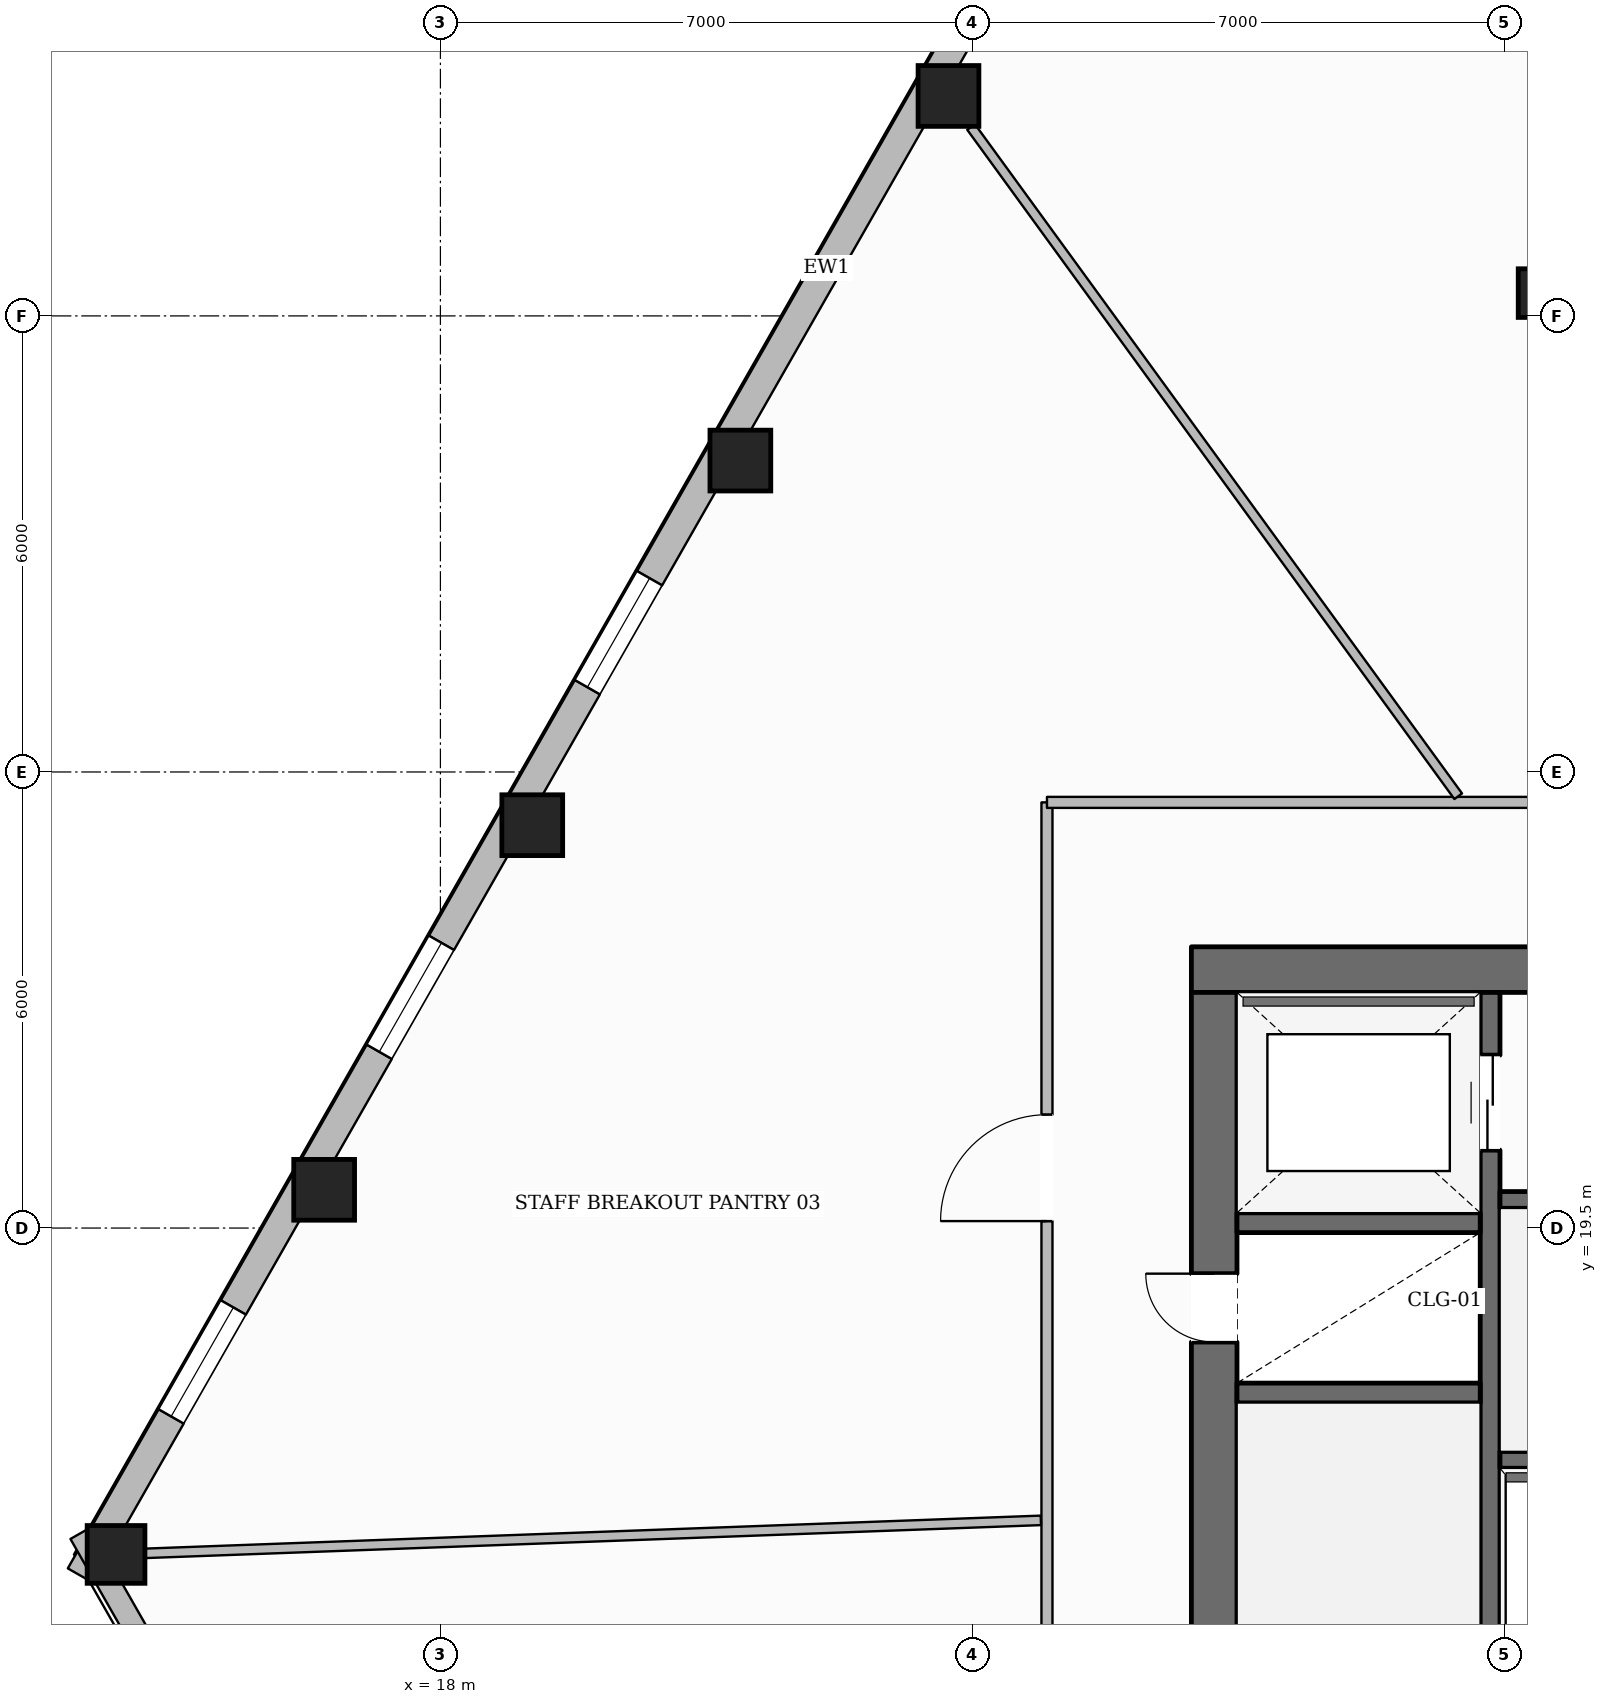
"""IFC4 building model, lengths in metres.
Left out: names, types, materials, properties, quantities, classifications, styles, units other than length and angle.
Written with IfcOpenShell. Run it as: python <this file> out.ifc"""

import sys

from ifc_helpers import new_model, si_unit, direction, frame, frame_2d, origin, origin_2d, place, context, subcontext, project, spatial, rectangle, hollow_rectangle, extrude, element, fill, save


model = new_model("IFC4")
c1 = context("Model", 3, precision=1e-05, world=origin(), true_north=direction((0.0, 1.0)))
c2 = subcontext(c1, "Body", "Model", "MODEL_VIEW")
j1 = project(units=[si_unit("LENGTHUNIT", "METRE"), si_unit("PLANEANGLEUNIT", "RADIAN")], contexts=[c1])
p1 = place(None, origin())
s1 = spatial("IfcSite", under=j1, at=p1, CompositionType="ELEMENT")
p2 = place(p1, origin())
s2 = spatial("IfcBuilding", under=s1, at=p2, CompositionType="ELEMENT")
p3 = place(p2, frame((0.0, 0.0, 29.1)))
s3 = spatial("IfcBuildingStorey", under=s2, at=p3, CompositionType="ELEMENT", Elevation=29.1)
p4 = place(p3, frame((27.88, 22.9, 0.0), z_axis=(0.0, 0.0, 1.0), x_axis=(1.0, 0.0, 0.0)))
e1 = element("IfcWall", 1, at=p4, inside=s3, PredefinedType="SOLIDWALL", context=c2, shape_type="SweptSolid", body=[
    extrude(rectangle(XDim=20.24, YDim=0.6, at=frame_2d((10.12, 0.0))), origin(), (0.0, 0.0, 1.0), 3.59),
])
p5 = place(p4, frame((6.395, 0.0, 0.0)))
e2 = element("IfcOpeningElement", 2, at=p5, cuts=e1, PredefinedType="OPENING", context=c2, shape_type="SweptSolid", body=[
    extrude(rectangle(XDim=1.05, YDim=2.15, at=frame_2d((0.525, 1.075))), frame((0.0, 0.31, 0.0), z_axis=(0.0, -1.0, 0.0), x_axis=(1.0, 0.0, 0.0)), (0.0, 0.0, 1.0), 0.62),
])
p6 = place(p4, frame((12.795, 0.0, 0.0)))
e3 = element("IfcOpeningElement", 3, at=p6, cuts=e1, PredefinedType="OPENING", context=c2, shape_type="SweptSolid", body=[
    extrude(rectangle(XDim=1.05, YDim=2.15, at=frame_2d((0.525, 1.075))), frame((0.0, 0.31, 0.0), z_axis=(0.0, -1.0, 0.0), x_axis=(1.0, 0.0, 0.0)), (0.0, 0.0, 1.0), 0.62),
])
p7 = place(p3, frame((28.18, 9.6, 0.0), z_axis=(0.0, 0.0, 1.0), x_axis=(0.0, 1.0, 0.0)))
e4 = element("IfcWall", 4, at=p7, inside=s3, PredefinedType="SOLIDWALL", context=c2, shape_type="SweptSolid", body=[
    extrude(rectangle(XDim=13.0, YDim=0.6, at=frame_2d((6.5, 0.0))), origin(), (0.0, 0.0, 1.0), 3.59),
])
p8 = place(p7, frame((0.2, 0.0, 0.0)))
e5 = element("IfcOpeningElement", 5, at=p8, cuts=e4, PredefinedType="OPENING", context=c2, shape_type="SweptSolid", body=[
    extrude(rectangle(XDim=1.1, YDim=2.15, at=frame_2d((0.55, 1.075))), frame((0.0, 0.31, 0.0), z_axis=(0.0, -1.0, 0.0), x_axis=(1.0, 0.0, 0.0)), (0.0, 0.0, 1.0), 0.62),
])
p9 = place(p7, frame((8.4, 0.0, 0.0)))
e6 = element("IfcOpeningElement", 6, at=p9, cuts=e4, PredefinedType="OPENING", context=c2, shape_type="SweptSolid", body=[
    extrude(rectangle(XDim=0.9, YDim=2.1, at=frame_2d((0.45, 1.05))), frame((0.0, 0.31, 0.0), z_axis=(0.0, -1.0, 0.0), x_axis=(1.0, 0.0, 0.0)), (0.0, 0.0, 1.0), 0.62),
])
p10 = place(p3, frame((31.81, 9.6, 0.0), z_axis=(0.0, 0.0, 1.0), x_axis=(0.0, 1.0, 0.0)))
e7 = element("IfcWall", 7, at=p10, inside=s3, PredefinedType="SHEAR", context=c2, shape_type="SweptSolid", body=[
    extrude(rectangle(XDim=13.0, YDim=0.26, at=frame_2d((6.5, 0.0))), origin(), (0.0, 0.0, 1.0), 3.59),
])
p11 = place(p10, frame((10.925, 0.0, 0.0)))
e8 = element("IfcOpeningElement", 8, at=p11, cuts=e7, PredefinedType="OPENING", context=c2, shape_type="SweptSolid", body=[
    extrude(rectangle(XDim=1.25, YDim=2.25, at=frame_2d((0.625, 1.125))), frame((0.0, 0.14, 0.0), z_axis=(0.0, -1.0, 0.0), x_axis=(1.0, 0.0, 0.0)), (0.0, 0.0, 1.0), 0.28),
])
for number, where, z_axis, x_axis in (
    (9, (28.48, 17.33, 0.0), (0.0, 0.0, 1.0), (1.0, 0.0, 0.0)),
    (10, (28.48, 19.57, 0.0), (0.0, 0.0, 1.0), (1.0, 0.0, 0.0)),
):
    element("IfcWall", number, at=place(p3, frame(where, z_axis=z_axis, x_axis=x_axis)), inside=s3, PredefinedType="SHEAR", context=c2, shape_type="SweptSolid", body=[
        extrude(rectangle(XDim=3.2, YDim=0.26, at=frame_2d((1.6, 0.0))), origin(), (0.0, 0.0, 1.0), 3.59),
    ])
p12 = place(p3, frame((31.94, 19.87, 0.0), z_axis=(0.0, 0.0, 1.0), x_axis=(1.0, 0.0, 0.0)))
e11 = element("IfcWall", 11, at=p12, inside=s3, PredefinedType="SOLIDWALL", context=c2, shape_type="SweptSolid", body=[
    extrude(rectangle(XDim=12.12, YDim=0.22, at=frame_2d((6.06, 0.0))), origin(), (0.0, 0.0, 1.0), 3.59),
])
p13 = place(p12, frame((6.3, 0.0, 0.0)))
e12 = element("IfcOpeningElement", 12, at=p13, cuts=e11, PredefinedType="OPENING", context=c2, shape_type="SweptSolid", body=[
    extrude(rectangle(XDim=1.1, YDim=2.15, at=frame_2d((0.55, 1.075))), frame((0.0, 0.12, 0.0), z_axis=(0.0, -1.0, 0.0), x_axis=(1.0, 0.0, 0.0)), (0.0, 0.0, 1.0), 0.24),
])
p14 = place(p12, frame((9.51, 0.0, 0.0)))
e13 = element("IfcOpeningElement", 13, at=p14, cuts=e11, PredefinedType="OPENING", context=c2, shape_type="SweptSolid", body=[
    extrude(rectangle(XDim=0.9, YDim=2.1, at=frame_2d((0.45, 1.05))), frame((0.0, 0.12, 0.0), z_axis=(0.0, -1.0, 0.0), x_axis=(1.0, 0.0, 0.0)), (0.0, 0.0, 1.0), 0.24),
])
p15 = place(p3, frame((31.94, 16.45, 0.0), z_axis=(0.0, 0.0, 1.0), x_axis=(1.0, 0.0, 0.0)))
e14 = element("IfcWall", 14, at=p15, inside=s3, PredefinedType="SOLIDWALL", context=c2, shape_type="SweptSolid", body=[
    extrude(rectangle(XDim=12.12, YDim=0.22, at=frame_2d((6.06, 0.0))), origin(), (0.0, 0.0, 1.0), 3.59),
])
for number, where, z_axis, x_axis in (
    (15, (24.684, 34.394, 0.0), (0.0, 0.0, 1.0), (1.0, 0.0, 0.0)),
    (16, (21.946, 29.597, 0.0), (0.0, 0.0, 1.0), (1.0, 0.0, 0.0)),
    (17, (19.208, 24.8, 0.0), (0.0, 0.0, 1.0), (1.0, 0.0, 0.0)),
    (18, (16.47, 20.003, 0.0), (0.0, 0.0, 1.0), (1.0, 0.0, 0.0)),
):
    element("IfcColumn", number, at=place(p3, frame(where, z_axis=z_axis, x_axis=x_axis)), inside=s3, PredefinedType="COLUMN", context=c2, shape_type="SweptSolid", body=[
        extrude(hollow_rectangle(XDim=0.8, YDim=0.8, WallThickness=0.036, at=origin_2d()), origin(), (0.0, 0.0, 1.0), 3.59),
    ])
p16 = place(p3, frame((13.733, 15.206, 0.0), z_axis=(0.0, 0.0, 1.0), x_axis=(1.0, 0.0, 0.0)))
e19 = element("IfcColumn", 19, at=p16, inside=s3, PredefinedType="COLUMN", context=c2, shape_type="SweptSolid", body=[
    extrude(hollow_rectangle(XDim=0.76, YDim=0.76, WallThickness=0.035, at=origin_2d()), origin(), (0.0, 0.0, 1.0), 3.59),
])
p17 = place(p3, frame((32.5, 31.8, 0.0), z_axis=(0.0, 0.0, 1.0), x_axis=(1.0, 0.0, 0.0)))
e20 = element("IfcColumn", 20, at=p17, inside=s3, PredefinedType="COLUMN", context=c2, shape_type="SweptSolid", body=[
    extrude(hollow_rectangle(XDim=0.64, YDim=0.64, WallThickness=0.028, at=origin_2d()), origin(), (0.0, 0.0, 1.0), 3.59),
])
p18 = place(p3, frame((13.263, 14.928, 0.0), z_axis=(0.0, 0.0, 1.0), x_axis=(0.495711630902, 0.868487178367, 0.0)))
e21 = element("IfcWall", 21, at=p18, inside=s3, PredefinedType="STANDARD", context=c2, shape_type="SweptSolid", body=[
    extrude(rectangle(XDim=34.092, YDim=0.38, at=frame_2d((17.046, 0.0))), origin(), (0.0, 0.0, 1.0), 2.97),
])
p19 = place(p18, frame((30.027, 0.0, 0.65)))
e22 = element("IfcOpeningElement", 22, at=p19, cuts=e21, PredefinedType="OPENING", context=c2, shape_type="SweptSolid", body=[
    extrude(rectangle(XDim=1.65, YDim=1.75, at=frame_2d((0.825, 0.875))), frame((0.0, 0.2, 0.0), z_axis=(0.0, -1.0, 0.0), x_axis=(1.0, 0.0, 0.0)), (0.0, 0.0, 1.0), 0.4),
])
p20 = place(p18, frame((24.504, 0.0, 0.65)))
e23 = element("IfcOpeningElement", 23, at=p20, cuts=e21, PredefinedType="OPENING", context=c2, shape_type="SweptSolid", body=[
    extrude(rectangle(XDim=1.65, YDim=1.75, at=frame_2d((0.825, 0.875))), frame((0.0, 0.2, 0.0), z_axis=(0.0, -1.0, 0.0), x_axis=(1.0, 0.0, 0.0)), (0.0, 0.0, 1.0), 0.4),
])
p21 = place(p18, frame((13.457, 0.0, 0.65)))
e24 = element("IfcOpeningElement", 24, at=p21, cuts=e21, PredefinedType="OPENING", context=c2, shape_type="SweptSolid", body=[
    extrude(rectangle(XDim=1.65, YDim=1.75, at=frame_2d((0.825, 0.875))), frame((0.0, 0.2, 0.0), z_axis=(0.0, -1.0, 0.0), x_axis=(1.0, 0.0, 0.0)), (0.0, 0.0, 1.0), 0.4),
])
p22 = place(p18, frame((7.934, 0.0, 0.65)))
e25 = element("IfcOpeningElement", 25, at=p22, cuts=e21, PredefinedType="OPENING", context=c2, shape_type="SweptSolid", body=[
    extrude(rectangle(XDim=1.65, YDim=1.75, at=frame_2d((0.825, 0.875))), frame((0.0, 0.2, 0.0), z_axis=(0.0, -1.0, 0.0), x_axis=(1.0, 0.0, 0.0)), (0.0, 0.0, 1.0), 0.4),
])
p23 = place(p18, frame((2.411, 0.0, 0.65)))
e26 = element("IfcOpeningElement", 26, at=p23, cuts=e21, PredefinedType="OPENING", context=c2, shape_type="SweptSolid", body=[
    extrude(rectangle(XDim=1.65, YDim=1.75, at=frame_2d((0.825, 0.875))), frame((0.0, 0.2, 0.0), z_axis=(0.0, -1.0, 0.0), x_axis=(1.0, 0.0, 0.0)), (0.0, 0.0, 1.0), 0.4),
])
p24 = place(p3, frame((21.58, 0.913, 0.0), z_axis=(0.0, 0.0, 1.0), x_axis=(-0.495706340457, 0.868490198005, 0.0)))
e27 = element("IfcWall", 27, at=p24, inside=s3, PredefinedType="STANDARD", context=c2, shape_type="SweptSolid", body=[
    extrude(rectangle(XDim=16.777, YDim=0.3, at=frame_2d((8.388, 0.0))), origin(), (0.0, 0.0, 1.0), 2.97),
])
p25 = place(p24, frame((7.789, 0.0, 0.65)))
e28 = element("IfcOpeningElement", 28, at=p25, cuts=e27, PredefinedType="OPENING", context=c2, shape_type="SweptSolid", body=[
    extrude(rectangle(XDim=1.2, YDim=1.7, at=frame_2d((0.6, 0.85))), frame((0.0, 0.16, 0.0), z_axis=(0.0, -1.0, 0.0), x_axis=(1.0, 0.0, 0.0)), (0.0, 0.0, 1.0), 0.32),
])
p26 = place(p3, frame((25.98, 9.1, 0.0), z_axis=(0.0, 0.0, 1.0), x_axis=(0.0, 1.0, 0.0)))
e29 = element("IfcWall", 29, at=p26, inside=s3, PredefinedType="PARTITIONING", context=c2, shape_type="SweptSolid", body=[
    extrude(rectangle(XDim=16.0, YDim=0.145, at=frame_2d((8.0, 0.0))), origin(), (0.0, 0.0, 1.0), 3.278),
])
p27 = place(p26, frame((10.491, 0.0, 0.0)))
e30 = element("IfcOpeningElement", 30, at=p27, cuts=e29, PredefinedType="OPENING", context=c2, shape_type="SweptSolid", body=[
    extrude(rectangle(XDim=1.4, YDim=2.2, at=frame_2d((0.7, 1.1))), frame((0.0, 0.083, 0.0), z_axis=(0.0, -1.0, 0.0), x_axis=(1.0, 0.0, 0.0)), (0.0, 0.0, 1.0), 0.165),
])
p28 = place(p26, frame((2.663, 0.0, 0.0)))
e31 = element("IfcOpeningElement", 31, at=p28, cuts=e29, PredefinedType="OPENING", context=c2, shape_type="SweptSolid", body=[
    extrude(rectangle(XDim=1.4, YDim=2.2, at=frame_2d((0.7, 1.1))), frame((0.0, 0.083, 0.0), z_axis=(0.0, -1.0, 0.0), x_axis=(1.0, 0.0, 0.0)), (0.0, 0.0, 1.0), 0.165),
])
p29 = place(p3, frame((25.98, 25.1, 0.0), z_axis=(0.0, 0.0, 1.0), x_axis=(1.0, 0.0, 0.0)))
e32 = element("IfcWall", 32, at=p29, inside=s3, PredefinedType="PARTITIONING", context=c2, shape_type="SweptSolid", body=[
    extrude(rectangle(XDim=11.02, YDim=0.145, at=frame_2d((5.51, 0.0))), origin(), (0.0, 0.0, 1.0), 3.59),
])
p30 = place(p3, frame((31.39, 25.18, 0.0), z_axis=(0.0, 0.0, 1.0), x_axis=(-0.588482227792, 0.808510153043, 0.0)))
e33 = element("IfcWall", 33, at=p30, inside=s3, PredefinedType="PARTITIONING", context=c2, shape_type="SweptSolid", body=[
    extrude(rectangle(XDim=10.891, YDim=0.125, at=frame_2d((5.445, 0.0))), origin(), (0.0, 0.0, 1.0), 3.057),
])
p31 = place(p3, frame((25.899, 15.654, 0.0), z_axis=(0.0, 0.0, 1.0), x_axis=(-0.999322388706, -0.036807111154, 0.0)))
e34 = element("IfcWall", 34, at=p31, inside=s3, PredefinedType="PARTITIONING", context=c2, shape_type="SweptSolid", body=[
    extrude(rectangle(XDim=11.787, YDim=0.125, at=frame_2d((5.894, 0.0))), origin(), (0.0, 0.0, 1.0), 3.057),
])
p32 = place(p21, origin())
e35 = element("IfcWindow", 35, at=p32, inside=s3, PartitioningType="SINGLE_PANEL", PredefinedType="WINDOW", context=c2, shape_type="SweptSolid", body=[
    extrude(rectangle(XDim=1.65, YDim=1.75, at=frame_2d((0.825, 0.875))), frame((0.0, 0.03, 0.0), z_axis=(0.0, -1.0, 0.0), x_axis=(1.0, 0.0, 0.0)), (0.0, 0.0, 1.0), 0.06),
])
fill(e24, e35)
p33 = place(p22, origin())
e36 = element("IfcWindow", 36, at=p33, inside=s3, PartitioningType="SINGLE_PANEL", PredefinedType="WINDOW", context=c2, shape_type="SweptSolid", body=[
    extrude(rectangle(XDim=1.65, YDim=1.75, at=frame_2d((0.825, 0.875))), frame((0.0, 0.03, 0.0), z_axis=(0.0, -1.0, 0.0), x_axis=(1.0, 0.0, 0.0)), (0.0, 0.0, 1.0), 0.06),
])
fill(e25, e36)
p34 = place(p23, origin())
e37 = element("IfcWindow", 37, at=p34, inside=s3, PartitioningType="SINGLE_PANEL", PredefinedType="WINDOW", context=c2, shape_type="SweptSolid", body=[
    extrude(rectangle(XDim=1.65, YDim=1.75, at=frame_2d((0.825, 0.875))), frame((0.0, 0.03, 0.0), z_axis=(0.0, -1.0, 0.0), x_axis=(1.0, 0.0, 0.0)), (0.0, 0.0, 1.0), 0.06),
])
fill(e26, e37)
p35 = place(p9, origin())
e38 = element("IfcDoor", 38, at=p35, inside=s3, OperationType="SINGLE_SWING_RIGHT", PredefinedType="DOOR", context=c2, shape_type="SweptSolid", body=[
    extrude(rectangle(XDim=0.9, YDim=2.1, at=frame_2d((0.45, 1.05))), frame((0.0, 0.025, 0.0), z_axis=(0.0, -1.0, 0.0), x_axis=(1.0, 0.0, 0.0)), (0.0, 0.0, 1.0), 0.05),
])
fill(e6, e38)
p36 = place(p11, origin())
e39 = element("IfcDoor", 39, at=p36, inside=s3, OperationType="DOUBLE_DOOR_SLIDING", PredefinedType="DOOR", context=c2, shape_type="SweptSolid", body=[
    extrude(rectangle(XDim=1.25, YDim=2.25, at=frame_2d((0.625, 1.125))), frame((0.0, 0.025, 0.0), z_axis=(0.0, -1.0, 0.0), x_axis=(1.0, 0.0, 0.0)), (0.0, 0.0, 1.0), 0.05),
])
fill(e8, e39)
p37 = place(p27, origin())
e40 = element("IfcDoor", 40, at=p37, inside=s3, OperationType="SINGLE_SWING_LEFT", PredefinedType="DOOR", context=c2, shape_type="SweptSolid", body=[
    extrude(rectangle(XDim=1.4, YDim=2.2, at=frame_2d((0.7, 1.1))), frame((0.0, 0.025, 0.0), z_axis=(0.0, -1.0, 0.0), x_axis=(1.0, 0.0, 0.0)), (0.0, 0.0, 1.0), 0.05),
])
fill(e30, e40)
save(model, sys.argv[1])
